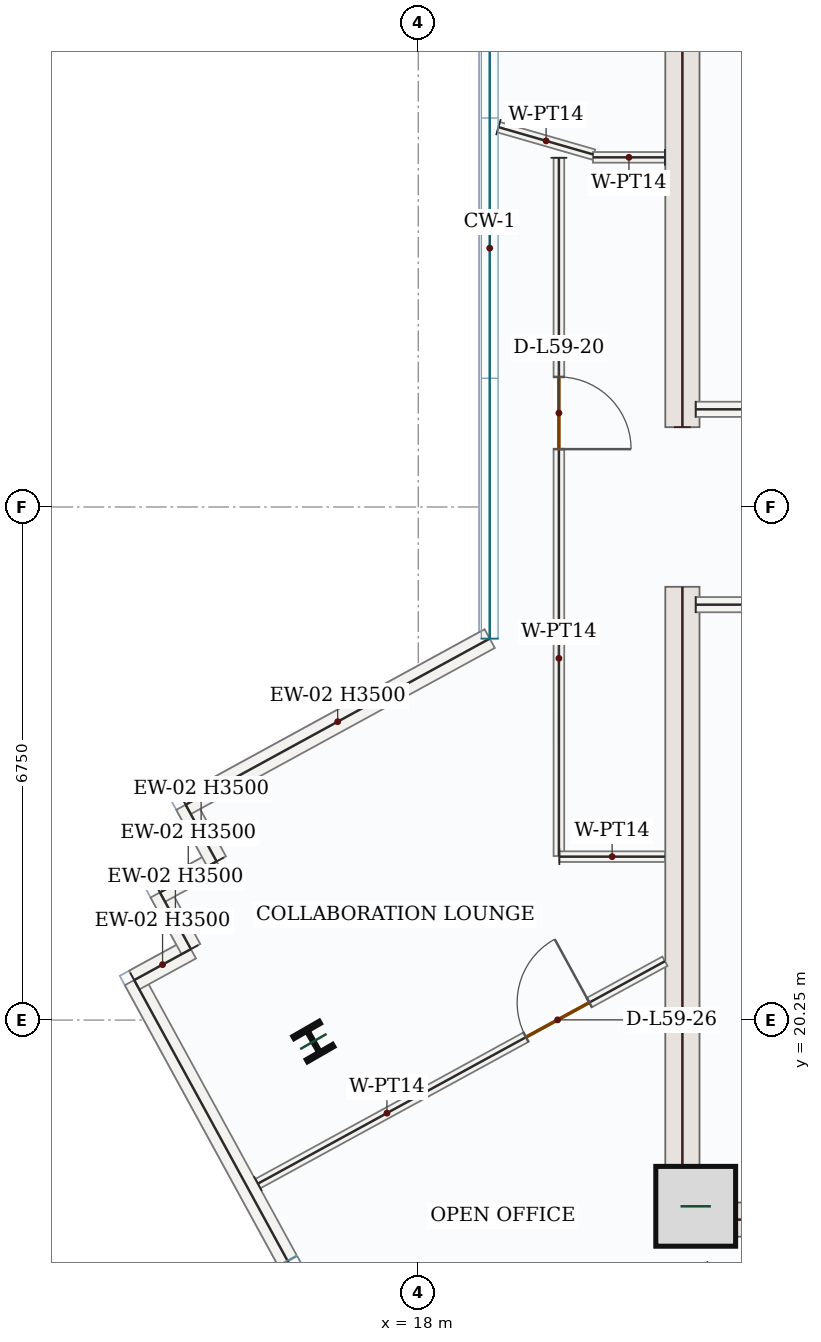
"""IFC4 building model, lengths in metres.
Left out: names, types, materials, properties, quantities, classifications, styles, units other than length and angle.
Written with IfcOpenShell. Run it as: python <this file> out.ifc"""

import sys

from ifc_helpers import new_model, si_unit, direction, frame, frame_2d, origin, origin_2d, place, context, subcontext, project, spatial, rectangle, i_section, extrude, source, transform, mapped, element, fill, save


model = new_model("IFC4")
c1 = context("Model", 3, precision=1e-05, world=origin(), true_north=direction((0.0, 1.0)))
c2 = subcontext(c1, "Body", "Model", "MODEL_VIEW")
j1 = project(units=[si_unit("LENGTHUNIT", "METRE"), si_unit("PLANEANGLEUNIT", "RADIAN")], contexts=[c1])
p1 = place(None, origin())
s1 = spatial("IfcSite", under=j1, at=p1, CompositionType="ELEMENT")
p2 = place(p1, origin())
s2 = spatial("IfcBuilding", under=s1, at=p2, CompositionType="ELEMENT")
p3 = place(p2, frame((0.0, 0.0, 250.35)))
s3 = spatial("IfcBuildingStorey", under=s2, at=p3, CompositionType="ELEMENT", Elevation=250.35)
m1 = source(origin(), c2, "Body", "SweptSolid", [
    extrude(rectangle(XDim=8.55, YDim=0.45, at=frame_2d((4.275, 0.0))), origin(), (0.0, 0.0, 1.0), 3.5),
])
for number, where, z_axis, x_axis in (
    (1, (21.475, 17.4, 0.0), (0.0, 0.0, 1.0), (0.0, 1.0, 0.0)),
    (2, (21.475, 28.05, 0.0), (0.0, 0.0, 1.0), (0.0, 1.0, 0.0)),
):
    element("IfcWall", number, at=place(p3, frame(where, z_axis=z_axis, x_axis=x_axis)), inside=s3, PredefinedType="SHEAR", context=c2, shape_type="MappedRepresentation", body=[
        mapped(m1, transform((0.0, 0.0, 0.0), x_axis=(1.0, 0.0, 0.0), y_axis=(0.0, 1.0, 0.0), z_axis=(0.0, 0.0, 1.0), scale=1.0)),
    ])
m2 = source(origin(), c2, "Body", "SweptSolid", [
    extrude(rectangle(XDim=7.1, YDim=0.45, at=frame_2d((3.55, 0.0))), origin(), (0.0, 0.0, 1.0), 3.5),
])
p4 = place(p3, frame((21.7, 17.625, 0.0), z_axis=(0.0, 0.0, 1.0), x_axis=(1.0, 0.0, 0.0)))
e3 = element("IfcWall", 3, at=p4, inside=s3, PredefinedType="SHEAR", context=c2, shape_type="MappedRepresentation", body=[
    mapped(m2, transform((0.0, 0.0, 0.0), x_axis=(1.0, 0.0, 0.0), y_axis=(0.0, 1.0, 0.0), z_axis=(0.0, 0.0, 1.0), scale=1.0)),
])
m3 = source(origin(), c2, "Body", "SweptSolid", [
    extrude(rectangle(XDim=1.05, YDim=1.05, at=origin_2d()), origin(), (0.0, 0.0, 1.0), 3.75),
])
p5 = place(p3, frame((21.65, 17.8, 0.0), z_axis=(0.0, 0.0, 1.0), x_axis=(1.0, 0.0, 0.0)))
e4 = element("IfcColumn", 4, at=p5, inside=s3, PredefinedType="COLUMN", context=c2, shape_type="MappedRepresentation", body=[
    mapped(m3, transform((0.0, 0.0, 0.0), x_axis=(1.0, 0.0, 0.0), y_axis=(0.0, 1.0, 0.0), z_axis=(0.0, 0.0, 1.0), scale=1.0)),
])
m4 = source(origin(), c2, "Body", "SweptSolid", [
    extrude(i_section(OverallWidth=0.399, OverallDepth=0.386, WebThickness=0.021, FlangeThickness=0.033, FilletRadius=0.018, at=origin_2d()), origin(), (0.0, 0.0, 1.0), 3.75),
])
p6 = place(p3, frame((16.62, 19.968, 0.0), z_axis=(0.0, 0.0, 1.0), x_axis=(0.866025403784, 0.5, 0.0)))
e5 = element("IfcColumn", 5, at=p6, inside=s3, PredefinedType="COLUMN", context=c2, shape_type="MappedRepresentation", body=[
    mapped(m4, transform((0.0, 0.0, 0.0), x_axis=(1.0, 0.0, 0.0), y_axis=(0.0, 1.0, 0.0), z_axis=(0.0, 0.0, 1.0), scale=1.0)),
])
p7 = place(p3, frame((19.019, 12.071, 0.0), z_axis=(0.0, 0.0, 1.0), x_axis=(-0.479472774144, 0.877556755347, 0.0)))
e6 = element("IfcWall", 6, at=p7, inside=s3, PredefinedType="SOLIDWALL", context=c2, shape_type="SweptSolid", body=[
    extrude(rectangle(XDim=9.92, YDim=0.28, at=frame_2d((4.96, 0.0))), origin(), (0.0, 0.0, 1.0), 3.5),
])
p8 = place(p7, frame((4.21, 0.0, 0.85)))
e7 = element("IfcOpeningElement", 7, at=p8, cuts=e6, PredefinedType="OPENING", context=c2, shape_type="SweptSolid", body=[
    extrude(rectangle(XDim=1.5, YDim=1.5, at=frame_2d((0.75, 0.75))), frame((0.0, 0.15, 0.0), z_axis=(0.0, -1.0, 0.0), x_axis=(1.0, 0.0, 0.0)), (0.0, 0.0, 1.0), 0.3),
])
m5 = source(origin(), c2, "Body", "SweptSolid", [
    extrude(rectangle(XDim=0.85, YDim=0.28, at=frame_2d((0.425, 0.0))), origin(), (0.0, 0.0, 1.0), 3.5),
])
p9 = place(p3, frame((14.263, 20.776, 0.0), z_axis=(0.0, 0.0, 1.0), x_axis=(0.87752219781, 0.479536017782, 0.0)))
e8 = element("IfcWall", 8, at=p9, inside=s3, PredefinedType="SOLIDWALL", context=c2, shape_type="MappedRepresentation", body=[
    mapped(m5, transform((0.0, 0.0, 0.0), x_axis=(1.0, 0.0, 0.0), y_axis=(0.0, 1.0, 0.0), z_axis=(0.0, 0.0, 1.0), scale=1.0)),
])
m6 = source(origin(), c2, "Body", "SweptSolid", [
    extrude(rectangle(XDim=0.85, YDim=0.28, at=frame_2d((0.425, 0.0))), origin(), (0.0, 0.0, 1.0), 3.5),
])
for number, where, z_axis, x_axis in (
    (9, (15.009, 21.184, 0.0), (0.0, 0.0, 1.0), (-0.479, 0.878, 0.0)),
    (10, (14.601, 21.929, 0.0), (0.0, 0.0, 1.0), (0.878, 0.479, 0.0)),
):
    element("IfcWall", number, at=place(p3, frame(where, z_axis=z_axis, x_axis=x_axis)), inside=s3, PredefinedType="SOLIDWALL", context=c2, shape_type="MappedRepresentation", body=[
        mapped(m6, transform((0.0, 0.0, 0.0), x_axis=(1.0, 0.0, 0.0), y_axis=(0.0, 1.0, 0.0), z_axis=(0.0, 0.0, 1.0), scale=1.0)),
    ])
m7 = source(origin(), c2, "Body", "SweptSolid", [
    extrude(rectangle(XDim=0.85, YDim=0.28, at=frame_2d((0.425, 0.0))), origin(), (0.0, 0.0, 1.0), 3.5),
])
p10 = place(p3, frame((15.347, 22.337, 0.0), z_axis=(0.0, 0.0, 1.0), x_axis=(-0.479314855696, 0.877643019177, 0.0)))
e11 = element("IfcWall", 11, at=p10, inside=s3, PredefinedType="SOLIDWALL", context=c2, shape_type="MappedRepresentation", body=[
    mapped(m7, transform((0.0, 0.0, 0.0), x_axis=(1.0, 0.0, 0.0), y_axis=(0.0, 1.0, 0.0), z_axis=(0.0, 0.0, 1.0), scale=1.0)),
])
m8 = source(origin(), c2, "Body", "SweptSolid", [
    extrude(rectangle(XDim=4.558, YDim=0.28, at=frame_2d((2.279, 0.0))), origin(), (0.0, 0.0, 1.0), 3.5),
])
p11 = place(p3, frame((14.94, 23.083, 0.0), z_axis=(0.0, 0.0, 1.0), x_axis=(0.877563774399, 0.479459927276, 0.0)))
e12 = element("IfcWall", 12, at=p11, inside=s3, PredefinedType="SOLIDWALL", context=c2, shape_type="MappedRepresentation", body=[
    mapped(m8, transform((0.0, 0.0, 0.0), x_axis=(1.0, 0.0, 0.0), y_axis=(0.0, 1.0, 0.0), z_axis=(0.0, 0.0, 1.0), scale=1.0)),
])
m9 = source(origin(), c2, "Body", "SweptSolid", [
    extrude(rectangle(XDim=4.25, YDim=0.2, at=frame_2d((2.125, 0.0))), origin(), (0.0, 0.0, 1.0), 3.5),
])
for number, where, z_axis, x_axis in (
    (13, (21.65, 25.715, 0.0), (0.0, 0.0, 1.0), (1.0, 0.0, 0.0)),
    (14, (21.65, 28.285, 0.0), (0.0, 0.0, 1.0), (1.0, 0.0, 0.0)),
):
    element("IfcWall", number, at=place(p3, frame(where, z_axis=z_axis, x_axis=x_axis)), inside=s3, PredefinedType="SOLIDWALL", context=c2, shape_type="MappedRepresentation", body=[
        mapped(m9, transform((0.0, 0.0, 0.0), x_axis=(1.0, 0.0, 0.0), y_axis=(0.0, 1.0, 0.0), z_axis=(0.0, 0.0, 1.0), scale=1.0)),
    ])
p12 = place(p3, frame((15.891, 18.099, 0.0), z_axis=(0.0, 0.0, 1.0), x_axis=(0.877574248726, 0.479440755436, 0.0)))
e15 = element("IfcWall", 15, at=p12, inside=s3, PredefinedType="PARTITIONING", context=c2, shape_type="SweptSolid", body=[
    extrude(rectangle(XDim=6.102, YDim=0.14, at=frame_2d((3.051, 0.0))), origin(), (0.0, 0.0, 1.0), 3.5),
])
p13 = place(p12, frame((4.018, 0.0, 0.0)))
e16 = element("IfcOpeningElement", 16, at=p13, cuts=e15, PredefinedType="OPENING", context=c2, shape_type="SweptSolid", body=[
    extrude(rectangle(XDim=0.95, YDim=2.15, at=frame_2d((0.475, 1.075))), frame((0.0, 0.08, 0.0), z_axis=(0.0, -1.0, 0.0), x_axis=(1.0, 0.0, 0.0)), (0.0, 0.0, 1.0), 0.16),
])
m10 = source(origin(), c2, "Body", "SweptSolid", [
    extrude(rectangle(XDim=1.305, YDim=0.14, at=frame_2d((0.652, 0.0))), origin(), (0.0, 0.0, 1.0), 3.5),
])
p14 = place(p3, frame((19.055, 31.998, 0.0), z_axis=(0.0, 0.0, 1.0), x_axis=(0.960836047515, -0.2771174657, 0.0)))
e17 = element("IfcWall", 17, at=p14, inside=s3, PredefinedType="PARTITIONING", context=c2, shape_type="MappedRepresentation", body=[
    mapped(m10, transform((0.0, 0.0, 0.0), x_axis=(1.0, 0.0, 0.0), y_axis=(0.0, 1.0, 0.0), z_axis=(0.0, 0.0, 1.0), scale=1.0)),
])
p15 = place(p3, frame((19.85, 31.594, 0.0), z_axis=(0.0, 0.0, 1.0), x_axis=(2.657666e-05, -0.999999999647, 0.0)))
e18 = element("IfcWall", 18, at=p15, inside=s3, PredefinedType="PARTITIONING", context=c2, shape_type="SweptSolid", body=[
    extrude(rectangle(XDim=9.186, YDim=0.14, at=frame_2d((4.593, 0.0))), origin(), (0.0, 0.0, 1.0), 3.5),
])
p16 = place(p15, frame((2.883, 0.0, 0.0)))
e19 = element("IfcOpeningElement", 19, at=p16, cuts=e18, PredefinedType="OPENING", context=c2, shape_type="SweptSolid", body=[
    extrude(rectangle(XDim=0.95, YDim=2.15, at=frame_2d((0.475, 1.075))), frame((0.0, 0.08, 0.0), z_axis=(0.0, -1.0, 0.0), x_axis=(1.0, 0.0, 0.0)), (0.0, 0.0, 1.0), 0.16),
])
m11 = source(origin(), c2, "Body", "SweptSolid", [
    extrude(rectangle(XDim=1.389, YDim=0.14, at=frame_2d((0.695, 0.0))), origin(), (0.0, 0.0, 1.0), 3.5),
])
p17 = place(p3, frame((19.856, 22.4, 0.0), z_axis=(0.0, 0.0, 1.0), x_axis=(1.0, 0.0, 0.0)))
e20 = element("IfcWall", 20, at=p17, inside=s3, PredefinedType="PARTITIONING", context=c2, shape_type="MappedRepresentation", body=[
    mapped(m11, transform((0.0, 0.0, 0.0), x_axis=(1.0, 0.0, 0.0), y_axis=(0.0, 1.0, 0.0), z_axis=(0.0, 0.0, 1.0), scale=1.0)),
])
m12 = source(origin(), c2, "Body", "SweptSolid", [
    extrude(rectangle(XDim=0.947, YDim=0.14, at=frame_2d((0.474, 0.0))), origin(), (0.0, 0.0, 1.0), 3.5),
])
p18 = place(p3, frame((21.245, 31.6, 0.0), z_axis=(0.0, 0.0, 1.0), x_axis=(-1.0, 0.0, 0.0)))
e21 = element("IfcWall", 21, at=p18, inside=s3, PredefinedType="PARTITIONING", context=c2, shape_type="MappedRepresentation", body=[
    mapped(m12, transform((0.0, 0.0, 0.0), x_axis=(1.0, 0.0, 0.0), y_axis=(0.0, 1.0, 0.0), z_axis=(0.0, 0.0, 1.0), scale=1.0)),
])
m13 = source(origin(), c2, "Body", "SweptSolid", [
    extrude(rectangle(XDim=1.5, YDim=1.5, at=frame_2d((0.75, 0.75))), frame((0.0, 0.03, 0.0), z_axis=(0.0, -1.0, 0.0), x_axis=(1.0, 0.0, 0.0)), (0.0, 0.0, 1.0), 0.06),
])
p19 = place(p8, origin())
e22 = element("IfcWindow", 22, at=p19, inside=s3, PartitioningType="SINGLE_PANEL", PredefinedType="WINDOW", context=c2, shape_type="MappedRepresentation", body=[
    mapped(m13, transform((0.0, 0.0, 0.0), x_axis=(1.0, 0.0, 0.0), y_axis=(0.0, 1.0, 0.0), z_axis=(0.0, 0.0, 1.0), scale=1.0)),
])
fill(e7, e22)
m14 = source(origin(), c2, "Body", "SweptSolid", [
    extrude(rectangle(XDim=0.95, YDim=2.15, at=frame_2d((0.475, 1.075))), frame((0.0, 0.025, 0.0), z_axis=(0.0, -1.0, 0.0), x_axis=(1.0, 0.0, 0.0)), (0.0, 0.0, 1.0), 0.05),
])
p20 = place(p16, origin())
e23 = element("IfcDoor", 23, at=p20, inside=s3, OperationType="SINGLE_SWING_RIGHT", PredefinedType="DOOR", context=c2, shape_type="MappedRepresentation", body=[
    mapped(m14, transform((0.0, 0.0, 0.0), x_axis=(1.0, 0.0, 0.0), y_axis=(0.0, 1.0, 0.0), z_axis=(0.0, 0.0, 1.0), scale=1.0)),
])
fill(e19, e23)
p21 = place(p13, origin())
e24 = element("IfcDoor", 24, at=p21, inside=s3, OperationType="SINGLE_SWING_RIGHT", PredefinedType="DOOR", context=c2, shape_type="MappedRepresentation", body=[
    mapped(m14, transform((0.0, 0.0, 0.0), x_axis=(1.0, 0.0, 0.0), y_axis=(0.0, 1.0, 0.0), z_axis=(0.0, 0.0, 1.0), scale=1.0)),
])
fill(e16, e24)
save(model, sys.argv[1])
